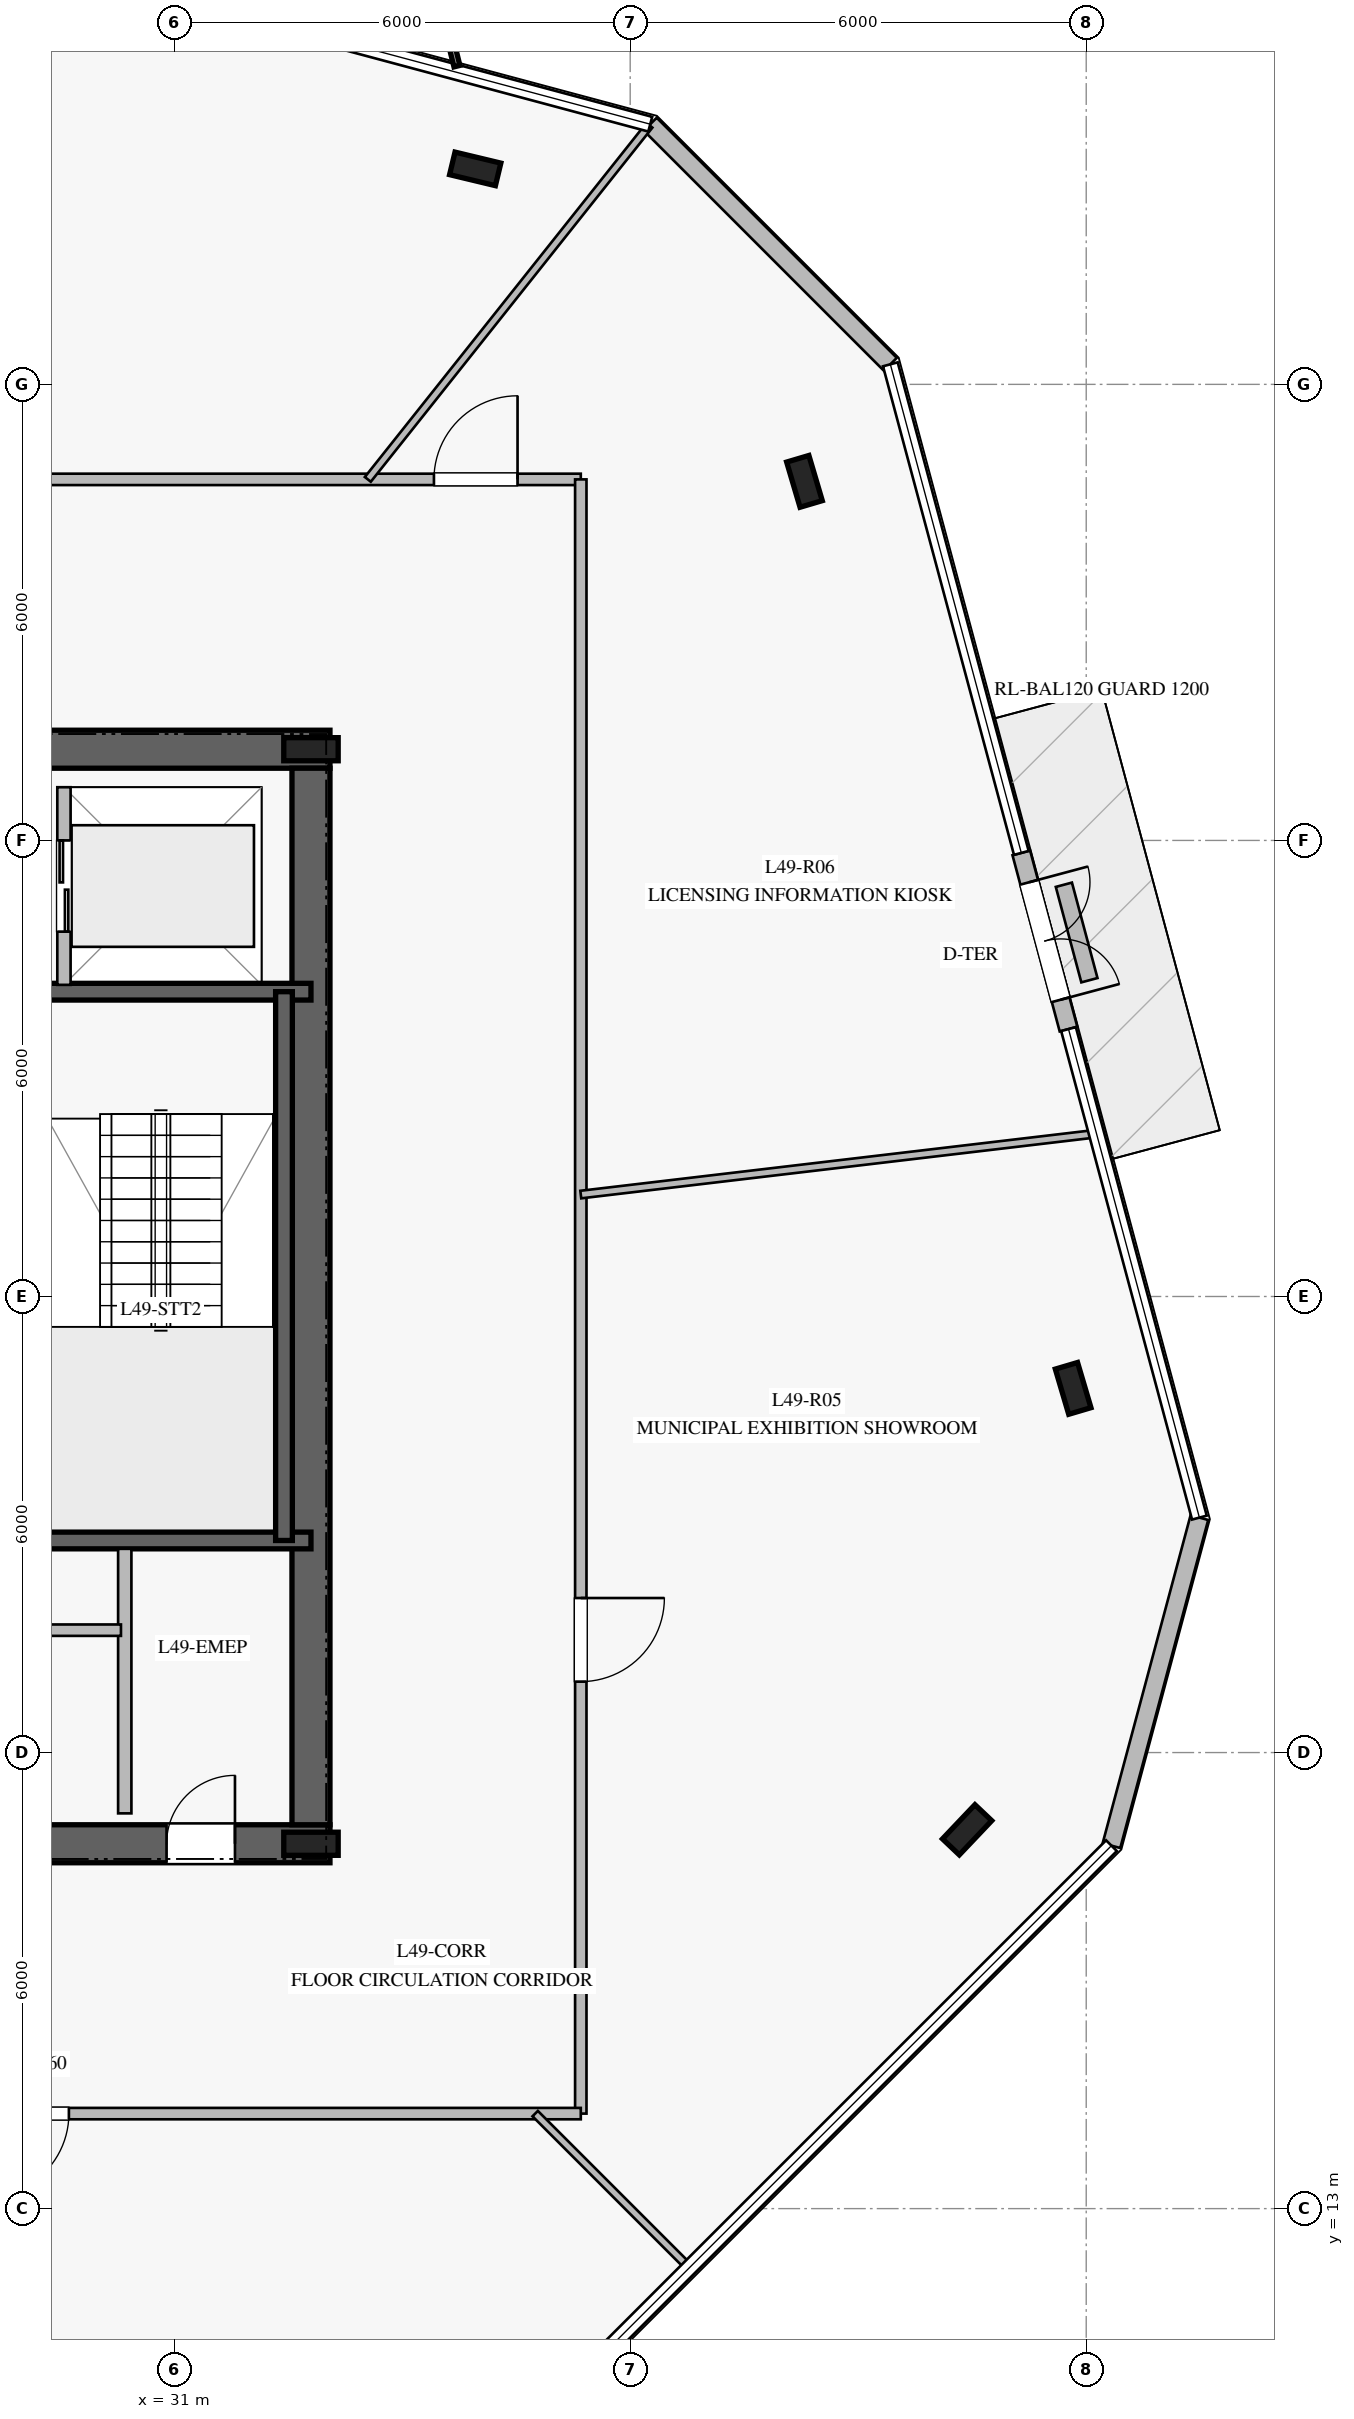
"""IFC4 building model, lengths in metres.
Left out: names, types, materials, properties, quantities, classifications, styles, units other than length and angle.
Written with IfcOpenShell. Run it as: python <this file> out.ifc"""

import sys

from ifc_helpers import new_model, si_unit, direction, frame, frame_2d, origin, origin_2d, place, context, subcontext, project, spatial, rectangle, i_section, extrude, element, fill, save


model = new_model("IFC4")
c1 = context("Model", 3, precision=1e-05, world=origin(), true_north=direction((0.0, 1.0)))
c2 = subcontext(c1, "Body", "Model", "MODEL_VIEW")
j1 = project(units=[si_unit("LENGTHUNIT", "METRE"), si_unit("PLANEANGLEUNIT", "RADIAN")], contexts=[c1])
p1 = place(None, origin())
s1 = spatial("IfcSite", under=j1, at=p1, CompositionType="ELEMENT")
p2 = place(p1, origin())
s2 = spatial("IfcBuilding", under=s1, at=p2, CompositionType="ELEMENT")
p3 = place(p2, frame((0.0, 0.0, 204.8)))
s3 = spatial("IfcBuildingStorey", under=s2, at=p3, CompositionType="ELEMENT", Elevation=204.8)
p4 = place(p3, frame((16.95, 17.8, 0.0), z_axis=(0.0, 0.0, 1.0), x_axis=(1.0, 0.0, 0.0)))
e1 = element("IfcWall", 1, at=p4, inside=s3, PredefinedType="SHEAR", context=c2, shape_type="SweptSolid", body=[
    extrude(rectangle(XDim=16.1, YDim=0.5, at=frame_2d((8.05, 0.0))), origin(), (0.0, 0.0, 1.0), 3.78),
])
p5 = place(p4, frame((5.0, 0.0, 0.0)))
e2 = element("IfcOpeningElement", 2, at=p5, cuts=e1, PredefinedType="OPENING", context=c2, shape_type="SweptSolid", body=[
    extrude(rectangle(XDim=1.2, YDim=2.25, at=frame_2d((0.6, 1.125))), frame((0.0, 0.26, 0.0), z_axis=(0.0, -1.0, 0.0), x_axis=(1.0, 0.0, 0.0)), (0.0, 0.0, 1.0), 0.52),
])
p6 = place(p4, frame((13.95, 0.0, 0.0)))
e3 = element("IfcOpeningElement", 3, at=p6, cuts=e1, PredefinedType="OPENING", context=c2, shape_type="SweptSolid", body=[
    extrude(rectangle(XDim=0.9, YDim=2.1, at=frame_2d((0.45, 1.05))), frame((0.0, 0.26, 0.0), z_axis=(0.0, -1.0, 0.0), x_axis=(1.0, 0.0, 0.0)), (0.0, 0.0, 1.0), 0.52),
])
p7 = place(p4, frame((9.825, 0.0, 0.0)))
e4 = element("IfcOpeningElement", 4, at=p7, cuts=e1, PredefinedType="OPENING", context=c2, shape_type="SweptSolid", body=[
    extrude(rectangle(XDim=1.1, YDim=2.2, at=frame_2d((0.55, 1.1))), frame((0.0, 0.26, 0.0), z_axis=(0.0, -1.0, 0.0), x_axis=(1.0, 0.0, 0.0)), (0.0, 0.0, 1.0), 0.52),
])
p8 = place(p3, frame((33.05, 32.2, 0.0), z_axis=(0.0, 0.0, 1.0), x_axis=(-1.0, 0.0, 0.0)))
e5 = element("IfcWall", 5, at=p8, inside=s3, PredefinedType="SHEAR", context=c2, shape_type="SweptSolid", body=[
    extrude(rectangle(XDim=16.1, YDim=0.5, at=frame_2d((8.05, 0.0))), origin(), (0.0, 0.0, 1.0), 3.78),
])
p9 = place(p8, frame((5.0, 0.0, 0.0)))
e6 = element("IfcOpeningElement", 6, at=p9, cuts=e5, PredefinedType="OPENING", context=c2, shape_type="SweptSolid", body=[
    extrude(rectangle(XDim=1.2, YDim=2.25, at=frame_2d((0.6, 1.125))), frame((0.0, 0.26, 0.0), z_axis=(0.0, -1.0, 0.0), x_axis=(1.0, 0.0, 0.0)), (0.0, 0.0, 1.0), 0.52),
])
p10 = place(p8, frame((9.825, 0.0, 0.0)))
e7 = element("IfcOpeningElement", 7, at=p10, cuts=e5, PredefinedType="OPENING", context=c2, shape_type="SweptSolid", body=[
    extrude(rectangle(XDim=1.1, YDim=2.2, at=frame_2d((0.55, 1.1))), frame((0.0, 0.26, 0.0), z_axis=(0.0, -1.0, 0.0), x_axis=(1.0, 0.0, 0.0)), (0.0, 0.0, 1.0), 0.52),
])
p11 = place(p3, frame((32.8, 18.05, 0.0), z_axis=(0.0, 0.0, 1.0), x_axis=(0.0, 1.0, 0.0)))
e8 = element("IfcWall", 8, at=p11, inside=s3, PredefinedType="SHEAR", context=c2, shape_type="SweptSolid", body=[
    extrude(rectangle(XDim=13.9, YDim=0.5, at=frame_2d((6.95, 0.0))), origin(), (0.0, 0.0, 1.0), 3.78),
])
for number, where, z_axis, x_axis in (
    (9, (32.8, 17.8, 0.0), (0.0, 0.0, 1.0), (1.0, 0.0, 0.0)),
    (10, (32.8, 32.2, 0.0), (0.0, 0.0, 1.0), (1.0, 0.0, 0.0)),
):
    element("IfcColumn", number, at=place(p3, frame(where, z_axis=z_axis, x_axis=x_axis)), inside=s3, PredefinedType="COLUMN", context=c2, shape_type="SweptSolid", body=[
        extrude(i_section(OverallWidth=0.304, OverallDepth=0.716, WebThickness=0.021, FlangeThickness=0.04, at=origin_2d()), origin(), (0.0, 0.0, 1.0), 4.0),
    ])
for number, where, z_axis, x_axis in (
    (11, (29.08, 21.79, 0.0), (0.0, 0.0, 1.0), (1.0, 0.0, 0.0)),
    (12, (29.08, 29.01, 0.0), (0.0, 0.0, 1.0), (1.0, 0.0, 0.0)),
):
    element("IfcWall", number, at=place(p3, frame(where, z_axis=z_axis, x_axis=x_axis)), inside=s3, PredefinedType="SOLIDWALL", context=c2, shape_type="SweptSolid", body=[
        extrude(rectangle(XDim=3.72, YDim=0.22, at=frame_2d((1.86, 0.0))), origin(), (0.0, 0.0, 1.0), 3.78),
    ])
p12 = place(p3, frame((32.445, 29.01, 0.0), z_axis=(0.0, 0.0, 1.0), x_axis=(0.0, -1.0, 0.0)))
e13 = element("IfcWall", 13, at=p12, inside=s3, PredefinedType="SOLIDWALL", context=c2, shape_type="SweptSolid", body=[
    extrude(rectangle(XDim=7.22, YDim=0.22, at=frame_2d((3.61, 0.0))), origin(), (0.0, 0.0, 1.0), 3.78),
])
for number, where, z_axis, x_axis in (
    (14, (34.961, 39.835, 0.0), (0.0, 0.0, 1.0), (-0.972, 0.233, 0.0)),
    (15, (41.433, 17.984, 0.0), (0.0, 0.0, 1.0), (0.688, 0.725, 0.0)),
    (16, (42.828, 23.791, 0.0), (0.0, 0.0, 1.0), (-0.284, 0.959, 0.0)),
    (17, (39.293, 35.724, 0.0), (0.0, 0.0, 1.0), (-0.284, 0.959, 0.0)),
):
    element("IfcColumn", number, at=place(p3, frame(where, z_axis=z_axis, x_axis=x_axis)), inside=s3, PredefinedType="COLUMN", context=c2, shape_type="SweptSolid", body=[
        extrude(i_section(OverallWidth=0.305, OverallDepth=0.62, WebThickness=0.021, FlangeThickness=0.04, at=origin_2d()), origin(), (0.0, 0.0, 1.0), 4.0),
    ])
p13 = place(p3, frame((43.332, 17.775, 0.0), z_axis=(0.0, 0.0, 1.0), x_axis=(0.258917234221, 0.965899511245, 0.0)))
e18 = element("IfcWall", 18, at=p13, inside=s3, PredefinedType="STANDARD", context=c2, shape_type="SweptSolid", body=[
    extrude(rectangle(XDim=4.469, YDim=0.24, at=frame_2d((2.234, 0.0))), origin(), (0.0, 0.0, 1.0), 3.78),
])
p14 = place(p3, frame((42.767, 28.518, 0.0), z_axis=(0.0, 0.0, 1.0), x_axis=(-0.258827623195, 0.965923527755, 0.0)))
e19 = element("IfcWall", 19, at=p14, inside=s3, PredefinedType="STANDARD", context=c2, shape_type="SweptSolid", body=[
    extrude(rectangle(XDim=2.4, YDim=0.24, at=frame_2d((1.2, 0.0))), origin(), (0.0, 0.0, 1.0), 3.78),
])
p15 = place(p14, frame((0.4, 0.0, 0.0)))
e20 = element("IfcOpeningElement", 20, at=p15, cuts=e19, PredefinedType="OPENING", context=c2, shape_type="SweptSolid", body=[
    extrude(rectangle(XDim=1.6, YDim=2.25, at=frame_2d((0.8, 1.125))), frame((0.0, 0.13, 0.0), z_axis=(0.0, -1.0, 0.0), x_axis=(1.0, 0.0, 0.0)), (0.0, 0.0, 1.0), 0.26),
])
p16 = place(p3, frame((40.423, 37.264, 0.0), z_axis=(0.0, 0.0, 1.0), x_axis=(-0.707106781187, 0.707106781187, 0.0)))
e21 = element("IfcWall", 21, at=p16, inside=s3, PredefinedType="STANDARD", context=c2, shape_type="SweptSolid", body=[
    extrude(rectangle(XDim=4.468, YDim=0.24, at=frame_2d((2.234, 0.0))), origin(), (0.0, 0.0, 1.0), 3.78),
])
p17 = place(p3, frame((43.042, 29.161, 0.0), z_axis=(0.0, 0.0, 1.0), x_axis=(-0.258363777467, 0.966047699906, 0.0)))
e22 = element("IfcWall", 22, at=p17, inside=s3, PredefinedType="USERDEFINED", context=c2, shape_type="SweptSolid", body=[
    extrude(rectangle(XDim=1.3, YDim=0.22, at=frame_2d((0.65, 0.0))), origin(), (0.0, 0.0, 1.0), 0.4),
])
p18 = place(p3, frame((30.35, 18.2, 0.0), z_axis=(0.0, 0.0, 1.0), x_axis=(0.0, 1.0, 0.0)))
e23 = element("IfcWall", 23, at=p18, inside=s3, PredefinedType="PARTITIONING", context=c2, shape_type="SweptSolid", body=[
    extrude(rectangle(XDim=3.48, YDim=0.175, at=frame_2d((1.74, 0.0))), origin(), (0.0, 0.0, 1.0), 3.78),
])
p19 = place(p3, frame((24.4, 20.61, 0.0), z_axis=(0.0, 0.0, 1.0), x_axis=(1.0, 0.0, 0.0)))
e24 = element("IfcWall", 24, at=p19, inside=s3, PredefinedType="PARTITIONING", context=c2, shape_type="SweptSolid", body=[
    extrude(rectangle(XDim=5.9, YDim=0.15, at=frame_2d((2.95, 0.0))), origin(), (0.0, 0.0, 1.0), 3.78),
])
p20 = place(p3, frame((29.55, 29.1, 0.0), z_axis=(0.0, 0.0, 1.0), x_axis=(0.0, 1.0, 0.0)))
e25 = element("IfcWall", 25, at=p20, inside=s3, PredefinedType="PARTITIONING", context=c2, shape_type="SweptSolid", body=[
    extrude(rectangle(XDim=2.6, YDim=0.175, at=frame_2d((1.3, 0.0))), origin(), (0.0, 0.0, 1.0), 3.78),
])
p21 = place(p20, frame((0.7, 0.0, 0.0)))
e26 = element("IfcOpeningElement", 26, at=p21, cuts=e25, PredefinedType="OPENING", context=c2, shape_type="SweptSolid", body=[
    extrude(rectangle(XDim=1.2, YDim=2.2, at=frame_2d((0.6, 1.1))), frame((0.0, 0.098, 0.0), z_axis=(0.0, -1.0, 0.0), x_axis=(1.0, 0.0, 0.0)), (0.0, 0.0, 1.0), 0.195),
])
p22 = place(p3, frame((13.65, 35.75, 0.0), z_axis=(0.0, 0.0, 1.0), x_axis=(1.0, 0.0, 0.0)))
e27 = element("IfcWall", 27, at=p22, inside=s3, PredefinedType="PARTITIONING", context=c2, shape_type="SweptSolid", body=[
    extrude(rectangle(XDim=22.7, YDim=0.15, at=frame_2d((11.35, 0.0))), origin(), (0.0, 0.0, 1.0), 3.05),
])
p23 = place(p22, frame((20.768, 0.0, 0.0)))
e28 = element("IfcOpeningElement", 28, at=p23, cuts=e27, PredefinedType="OPENING", context=c2, shape_type="SweptSolid", body=[
    extrude(rectangle(XDim=1.1, YDim=2.2, at=frame_2d((0.55, 1.1))), frame((0.0, 0.085, 0.0), z_axis=(0.0, -1.0, 0.0), x_axis=(1.0, 0.0, 0.0)), (0.0, 0.0, 1.0), 0.17),
])
p24 = place(p22, frame((14.301, 0.0, 0.0)))
e29 = element("IfcOpeningElement", 29, at=p24, cuts=e27, PredefinedType="OPENING", context=c2, shape_type="SweptSolid", body=[
    extrude(rectangle(XDim=1.1, YDim=2.2, at=frame_2d((0.55, 1.1))), frame((0.0, 0.085, 0.0), z_axis=(0.0, -1.0, 0.0), x_axis=(1.0, 0.0, 0.0)), (0.0, 0.0, 1.0), 0.17),
])
p25 = place(p22, frame((4.412, 0.0, 0.0)))
e30 = element("IfcOpeningElement", 30, at=p25, cuts=e27, PredefinedType="OPENING", context=c2, shape_type="SweptSolid", body=[
    extrude(rectangle(XDim=1.1, YDim=2.2, at=frame_2d((0.55, 1.1))), frame((0.0, 0.085, 0.0), z_axis=(0.0, -1.0, 0.0), x_axis=(1.0, 0.0, 0.0)), (0.0, 0.0, 1.0), 0.17),
])
p26 = place(p3, frame((36.35, 35.75, 0.0), z_axis=(0.0, 0.0, 1.0), x_axis=(0.0, -1.0, 0.0)))
e31 = element("IfcWall", 31, at=p26, inside=s3, PredefinedType="PARTITIONING", context=c2, shape_type="SweptSolid", body=[
    extrude(rectangle(XDim=21.5, YDim=0.15, at=frame_2d((10.75, 0.0))), origin(), (0.0, 0.0, 1.0), 3.05),
])
p27 = place(p26, frame((14.717, 0.0, 0.0)))
e32 = element("IfcOpeningElement", 32, at=p27, cuts=e31, PredefinedType="OPENING", context=c2, shape_type="SweptSolid", body=[
    extrude(rectangle(XDim=1.1, YDim=2.2, at=frame_2d((0.55, 1.1))), frame((0.0, 0.085, 0.0), z_axis=(0.0, -1.0, 0.0), x_axis=(1.0, 0.0, 0.0)), (0.0, 0.0, 1.0), 0.17),
])
p28 = place(p3, frame((36.35, 14.25, 0.0), z_axis=(0.0, 0.0, 1.0), x_axis=(-1.0, 0.0, 0.0)))
e33 = element("IfcWall", 33, at=p28, inside=s3, PredefinedType="PARTITIONING", context=c2, shape_type="SweptSolid", body=[
    extrude(rectangle(XDim=22.7, YDim=0.15, at=frame_2d((11.35, 0.0))), origin(), (0.0, 0.0, 1.0), 3.05),
])
p29 = place(p28, frame((17.741, 0.0, 0.0)))
e34 = element("IfcOpeningElement", 34, at=p29, cuts=e33, PredefinedType="OPENING", context=c2, shape_type="SweptSolid", body=[
    extrude(rectangle(XDim=1.1, YDim=2.2, at=frame_2d((0.55, 1.1))), frame((0.0, 0.085, 0.0), z_axis=(0.0, -1.0, 0.0), x_axis=(1.0, 0.0, 0.0)), (0.0, 0.0, 1.0), 0.17),
])
p30 = place(p28, frame((6.735, 0.0, 0.0)))
e35 = element("IfcOpeningElement", 35, at=p30, cuts=e33, PredefinedType="OPENING", context=c2, shape_type="SweptSolid", body=[
    extrude(rectangle(XDim=1.1, YDim=2.2, at=frame_2d((0.55, 1.1))), frame((0.0, 0.085, 0.0), z_axis=(0.0, -1.0, 0.0), x_axis=(1.0, 0.0, 0.0)), (0.0, 0.0, 1.0), 0.17),
])
p31 = place(p3, frame((35.75, 14.25, 0.0), z_axis=(0.0, 0.0, 1.0), x_axis=(0.707106781187, -0.707106781187, 0.0)))
e36 = element("IfcWall", 36, at=p31, inside=s3, PredefinedType="MOVABLE", context=c2, shape_type="SweptSolid", body=[
    extrude(rectangle(XDim=2.851, YDim=0.1, at=frame_2d((1.426, 0.0))), origin(), (0.0, 0.0, 1.0), 3.18),
])
p32 = place(p3, frame((36.35, 26.341, 0.0), z_axis=(0.0, 0.0, 1.0), x_axis=(0.993085158578, 0.117396200161, 0.0)))
e37 = element("IfcWall", 37, at=p32, inside=s3, PredefinedType="MOVABLE", context=c2, shape_type="SweptSolid", body=[
    extrude(rectangle(XDim=6.815, YDim=0.1, at=frame_2d((3.407, 0.0))), origin(), (0.0, 0.0, 1.0), 3.18),
])
p33 = place(p3, frame((33.548, 35.75, 0.0), z_axis=(0.0, 0.0, 1.0), x_axis=(0.622406520703, 0.782694143958, 0.0)))
e38 = element("IfcWall", 38, at=p33, inside=s3, PredefinedType="MOVABLE", context=c2, shape_type="SweptSolid", body=[
    extrude(rectangle(XDim=5.952, YDim=0.1, at=frame_2d((2.976, 0.0))), origin(), (0.0, 0.0, 1.0), 3.18),
])
p34 = place(p15, frame((1.6, 0.0, 0.0), z_axis=(0.0, 0.0, 1.0), x_axis=(-1.0, 0.0, 0.0)))
e39 = element("IfcDoor", 39, at=p34, inside=s3, OperationType="DOUBLE_DOOR_SINGLE_SWING", PredefinedType="DOOR", context=c2, shape_type="SweptSolid", body=[
    extrude(rectangle(XDim=1.6, YDim=2.25, at=frame_2d((0.8, 1.125))), frame((0.0, 0.025, 0.0), z_axis=(0.0, -1.0, 0.0), x_axis=(1.0, 0.0, 0.0)), (0.0, 0.0, 1.0), 0.05),
])
fill(e20, e39)
p35 = place(p6, origin())
e40 = element("IfcDoor", 40, at=p35, inside=s3, OperationType="SINGLE_SWING_RIGHT", PredefinedType="DOOR", context=c2, shape_type="SweptSolid", body=[
    extrude(rectangle(XDim=0.9, YDim=2.1, at=frame_2d((0.45, 1.05))), frame((0.0, 0.025, 0.0), z_axis=(0.0, -1.0, 0.0), x_axis=(1.0, 0.0, 0.0)), (0.0, 0.0, 1.0), 0.05),
])
fill(e3, e40)
p36 = place(p21, origin())
e41 = element("IfcDoor", 41, at=p36, inside=s3, OperationType="DOUBLE_DOOR_SLIDING", PredefinedType="DOOR", context=c2, shape_type="SweptSolid", body=[
    extrude(rectangle(XDim=1.2, YDim=2.2, at=frame_2d((0.6, 1.1))), frame((0.0, 0.025, 0.0), z_axis=(0.0, -1.0, 0.0), x_axis=(1.0, 0.0, 0.0)), (0.0, 0.0, 1.0), 0.05),
])
fill(e26, e41)
p37 = place(p30, origin())
e42 = element("IfcDoor", 42, at=p37, inside=s3, OperationType="SINGLE_SWING_RIGHT", PredefinedType="DOOR", context=c2, shape_type="SweptSolid", body=[
    extrude(rectangle(XDim=1.1, YDim=2.2, at=frame_2d((0.55, 1.1))), frame((0.0, 0.025, 0.0), z_axis=(0.0, -1.0, 0.0), x_axis=(1.0, 0.0, 0.0)), (0.0, 0.0, 1.0), 0.05),
])
fill(e35, e42)
p38 = place(p27, origin())
e43 = element("IfcDoor", 43, at=p38, inside=s3, OperationType="SINGLE_SWING_LEFT", PredefinedType="DOOR", context=c2, shape_type="SweptSolid", body=[
    extrude(rectangle(XDim=1.1, YDim=2.2, at=frame_2d((0.55, 1.1))), frame((0.0, 0.025, 0.0), z_axis=(0.0, -1.0, 0.0), x_axis=(1.0, 0.0, 0.0)), (0.0, 0.0, 1.0), 0.05),
])
fill(e32, e43)
p39 = place(p23, origin())
e44 = element("IfcDoor", 44, at=p39, inside=s3, OperationType="SINGLE_SWING_RIGHT", PredefinedType="DOOR", context=c2, shape_type="SweptSolid", body=[
    extrude(rectangle(XDim=1.1, YDim=2.2, at=frame_2d((0.55, 1.1))), frame((0.0, 0.025, 0.0), z_axis=(0.0, -1.0, 0.0), x_axis=(1.0, 0.0, 0.0)), (0.0, 0.0, 1.0), 0.05),
])
fill(e28, e44)
save(model, sys.argv[1])
